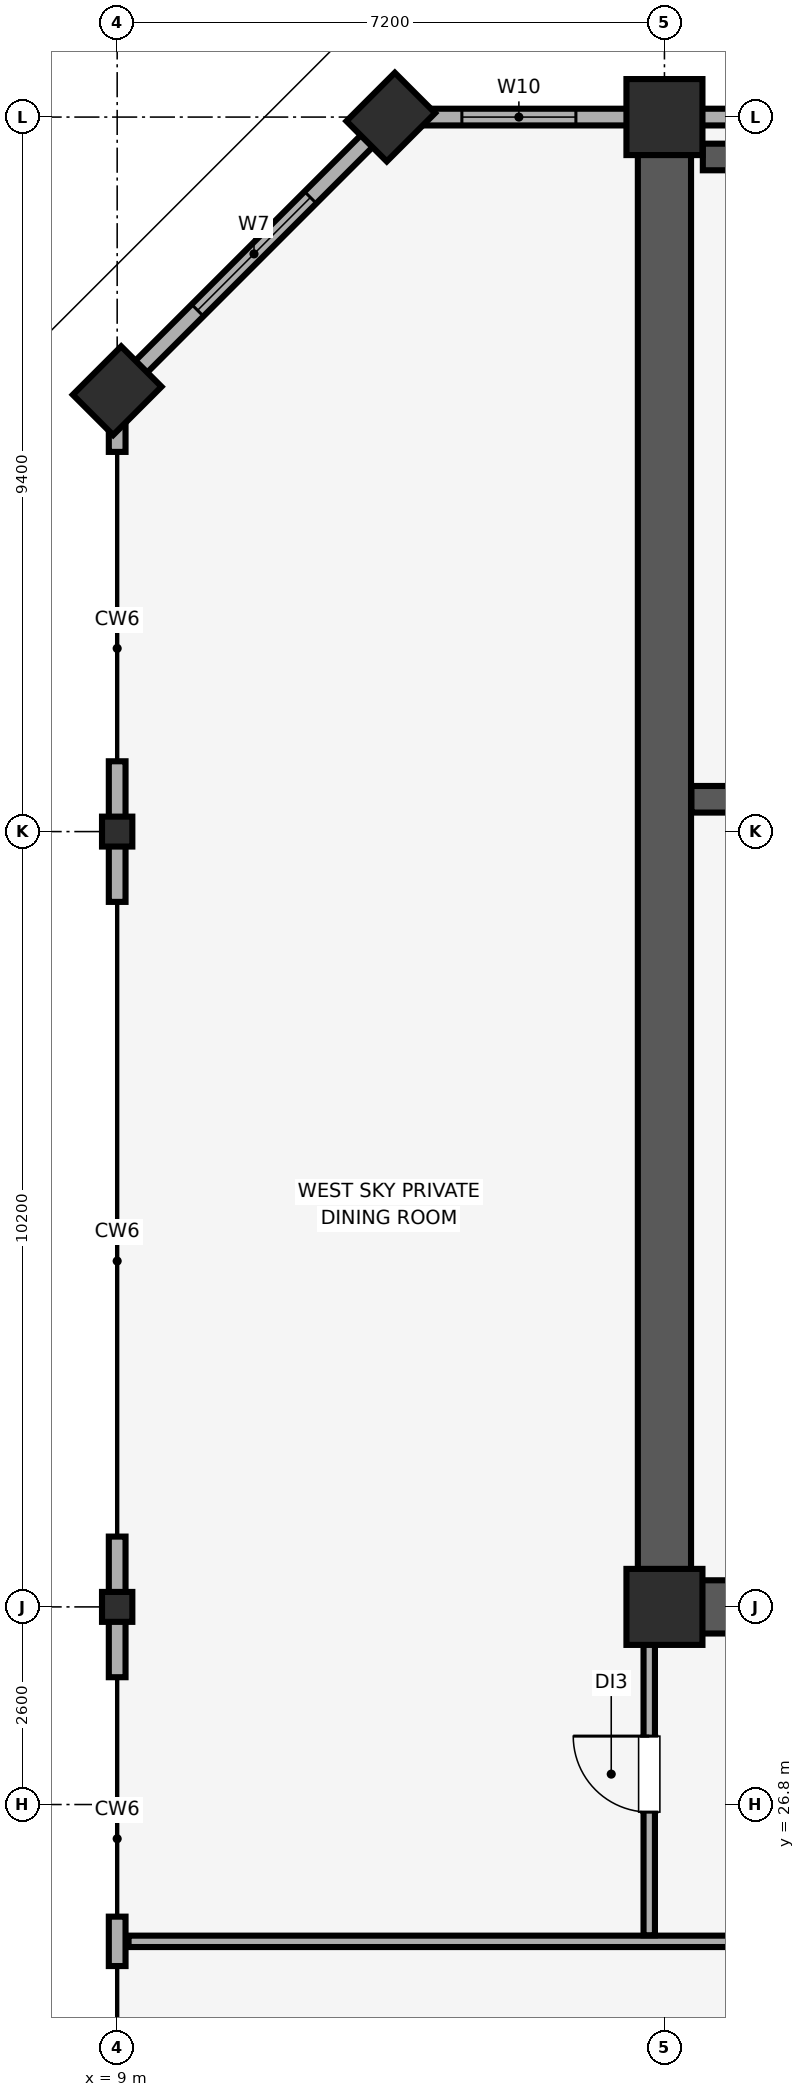
"""IFC4 building model, lengths in metres.
Left out: names, types, materials, properties, quantities, classifications, styles, units other than length and angle.
Written with IfcOpenShell. Run it as: python <this file> out.ifc"""

import sys

from ifc_helpers import new_model, si_unit, direction, frame, frame_2d, origin, origin_2d, place, context, subcontext, project, spatial, rectangle, i_section, extrude, element, fill, save


model = new_model("IFC4")
c1 = context("Model", 3, precision=1e-05, world=origin(), true_north=direction((0.0, 1.0)))
c2 = subcontext(c1, "Body", "Model", "MODEL_VIEW")
j1 = project(units=[si_unit("LENGTHUNIT", "METRE"), si_unit("PLANEANGLEUNIT", "RADIAN")], contexts=[c1])
p1 = place(None, origin())
s1 = spatial("IfcSite", under=j1, at=p1, CompositionType="ELEMENT")
p2 = place(p1, origin())
s2 = spatial("IfcBuilding", under=s1, at=p2, CompositionType="ELEMENT")
p3 = place(p2, frame((0.0, 0.0, 305.7)))
s3 = spatial("IfcBuildingStorey", under=s2, at=p3, CompositionType="ELEMENT", Elevation=305.7)
for number, where, z_axis, x_axis in (
    (1, (9.0, 29.4, 0.0), (0.0, 0.0, 1.0), (1.0, 0.0, 0.0)),
    (2, (9.0, 39.6, 0.0), (0.0, 0.0, 1.0), (1.0, 0.0, 0.0)),
):
    element("IfcColumn", number, at=place(p3, frame(where, z_axis=z_axis, x_axis=x_axis)), inside=s3, PredefinedType="COLUMN", context=c2, shape_type="SweptSolid", body=[
        extrude(i_section(OverallWidth=0.399, OverallDepth=0.394, WebThickness=0.023, FlangeThickness=0.037, FilletRadius=0.015, at=origin_2d()), origin(), (0.0, 0.0, 1.0), 4.7),
    ])
for number, where, z_axis, x_axis in (
    (3, (12.6, 49.0, 0.0), (0.0, 0.0, 1.0), (0.707, 0.707, 0.0)),
    (4, (9.0, 45.4, 0.0), (0.0, 0.0, 1.0), (0.707, 0.707, 0.0)),
):
    element("IfcColumn", number, at=place(p3, frame(where, z_axis=z_axis, x_axis=x_axis)), inside=s3, PredefinedType="PILASTER", context=c2, shape_type="SweptSolid", body=[
        extrude(rectangle(XDim=0.9, YDim=0.75, at=origin_2d()), origin(), (0.0, 0.0, 1.0), 4.7),
    ])
for number, where, z_axis, x_axis in (
    (5, (16.2, 29.4, 0.0), (0.0, 0.0, 1.0), (1.0, 0.0, 0.0)),
    (6, (16.2, 49.0, 0.0), (0.0, 0.0, 1.0), (1.0, 0.0, 0.0)),
):
    element("IfcColumn", number, at=place(p3, frame(where, z_axis=z_axis, x_axis=x_axis)), inside=s3, PredefinedType="COLUMN", context=c2, shape_type="SweptSolid", body=[
        extrude(rectangle(XDim=1.0, YDim=1.0, at=origin_2d()), origin(), (0.0, 0.0, 1.0), 4.7),
    ])
p4 = place(p3, frame((71.4, 49.0, 0.0), z_axis=(0.0, 0.0, 1.0), x_axis=(-1.0, 0.0, 0.0)))
e7 = element("IfcWall", 7, at=p4, inside=s3, PredefinedType="SOLIDWALL", context=c2, shape_type="SweptSolid", body=[
    extrude(rectangle(XDim=58.8, YDim=0.22, at=frame_2d((29.4, 0.0))), origin(), (0.0, 0.0, 1.0), 3.9),
])
p5 = place(p4, frame((56.365, 0.0, 0.85)))
e8 = element("IfcOpeningElement", 8, at=p5, cuts=e7, PredefinedType="OPENING", context=c2, shape_type="SweptSolid", body=[
    extrude(rectangle(XDim=1.5, YDim=1.4, at=frame_2d((0.75, 0.7))), frame((0.0, 0.12, 0.0), z_axis=(0.0, -1.0, 0.0), x_axis=(1.0, 0.0, 0.0)), (0.0, 0.0, 1.0), 0.24),
])
p6 = place(p4, frame((0.935, 0.0, 0.85)))
e9 = element("IfcOpeningElement", 9, at=p6, cuts=e7, PredefinedType="OPENING", context=c2, shape_type="SweptSolid", body=[
    extrude(rectangle(XDim=1.5, YDim=1.4, at=frame_2d((0.75, 0.7))), frame((0.0, 0.12, 0.0), z_axis=(0.0, -1.0, 0.0), x_axis=(1.0, 0.0, 0.0)), (0.0, 0.0, 1.0), 0.24),
])
p7 = place(p4, frame((41.915, 0.0, 0.9)))
e10 = element("IfcOpeningElement", 10, at=p7, cuts=e7, PredefinedType="OPENING", context=c2, shape_type="SweptSolid", body=[
    extrude(rectangle(XDim=3.6, YDim=1.5, at=frame_2d((1.8, 0.75))), frame((0.0, 0.12, 0.0), z_axis=(0.0, -1.0, 0.0), x_axis=(1.0, 0.0, 0.0)), (0.0, 0.0, 1.0), 0.24),
])
p8 = place(p4, frame((35.7, 0.0, 0.9)))
e11 = element("IfcOpeningElement", 11, at=p8, cuts=e7, PredefinedType="OPENING", context=c2, shape_type="SweptSolid", body=[
    extrude(rectangle(XDim=2.4, YDim=1.5, at=frame_2d((1.2, 0.75))), frame((0.0, 0.12, 0.0), z_axis=(0.0, -1.0, 0.0), x_axis=(1.0, 0.0, 0.0)), (0.0, 0.0, 1.0), 0.24),
])
p9 = place(p4, frame((18.95, 0.0, 0.9)))
e12 = element("IfcOpeningElement", 12, at=p9, cuts=e7, PredefinedType="OPENING", context=c2, shape_type="SweptSolid", body=[
    extrude(rectangle(XDim=3.0, YDim=1.5, at=frame_2d((1.5, 0.75))), frame((0.0, 0.12, 0.0), z_axis=(0.0, -1.0, 0.0), x_axis=(1.0, 0.0, 0.0)), (0.0, 0.0, 1.0), 0.24),
])
p10 = place(p4, frame((14.635, 0.0, 0.9)))
e13 = element("IfcOpeningElement", 13, at=p10, cuts=e7, PredefinedType="OPENING", context=c2, shape_type="SweptSolid", body=[
    extrude(rectangle(XDim=2.4, YDim=1.5, at=frame_2d((1.2, 0.75))), frame((0.0, 0.12, 0.0), z_axis=(0.0, -1.0, 0.0), x_axis=(1.0, 0.0, 0.0)), (0.0, 0.0, 1.0), 0.24),
])
p11 = place(p3, frame((12.6, 49.0, 0.0), z_axis=(0.0, 0.0, 1.0), x_axis=(-0.707106781187, -0.707106781187, 0.0)))
e14 = element("IfcWall", 14, at=p11, inside=s3, PredefinedType="SOLIDWALL", context=c2, shape_type="SweptSolid", body=[
    extrude(rectangle(XDim=5.091, YDim=0.22, at=frame_2d((2.546, 0.0))), origin(), (0.0, 0.0, 1.0), 3.9),
])
p12 = place(p11, frame((1.496, 0.0, 0.85)))
e15 = element("IfcOpeningElement", 15, at=p12, cuts=e14, PredefinedType="OPENING", context=c2, shape_type="SweptSolid", body=[
    extrude(rectangle(XDim=2.1, YDim=1.6, at=frame_2d((1.05, 0.8))), frame((0.0, 0.12, 0.0), z_axis=(0.0, -1.0, 0.0), x_axis=(1.0, 0.0, 0.0)), (0.0, 0.0, 1.0), 0.24),
])
p13 = place(p3, frame((9.0, 45.4, 0.0), z_axis=(0.0, 0.0, 1.0), x_axis=(0.0, -1.0, 0.0)))
e16 = element("IfcWall", 16, at=p13, inside=s3, PredefinedType="SOLIDWALL", context=c2, shape_type="SweptSolid", body=[
    extrude(rectangle(XDim=0.805, YDim=0.22, at=frame_2d((0.402, 0.0))), origin(), (0.0, 0.0, 1.0), 4.7),
])
for number, where, z_axis, x_axis in (
    (17, (9.0, 40.525, 0.0), (0.0, 0.0, 1.0), (0.0, -1.0, 0.0)),
    (18, (9.0, 30.325, 0.0), (0.0, 0.0, 1.0), (0.0, -1.0, 0.0)),
):
    element("IfcWall", number, at=place(p3, frame(where, z_axis=z_axis, x_axis=x_axis)), inside=s3, PredefinedType="SOLIDWALL", context=c2, shape_type="SweptSolid", body=[
        extrude(rectangle(XDim=1.85, YDim=0.22, at=frame_2d((0.925, 0.0))), origin(), (0.0, 0.0, 1.0), 3.9),
    ])
p14 = place(p3, frame((9.0, 25.325, 0.0), z_axis=(0.0, 0.0, 1.0), x_axis=(0.0, -1.0, 0.0)))
e19 = element("IfcWall", 19, at=p14, inside=s3, PredefinedType="SOLIDWALL", context=c2, shape_type="SweptSolid", body=[
    extrude(rectangle(XDim=0.65, YDim=0.22, at=frame_2d((0.325, 0.0))), origin(), (0.0, 0.0, 1.0), 3.9),
])
p15 = place(p3, frame((16.2, 29.4, 0.0), z_axis=(0.0, 0.0, 1.0), x_axis=(0.0, 1.0, 0.0)))
e20 = element("IfcWall", 20, at=p15, inside=s3, PredefinedType="SHEAR", context=c2, shape_type="SweptSolid", body=[
    extrude(rectangle(XDim=19.2, YDim=0.7, at=frame_2d((9.6, 0.0))), origin(), (0.0, 0.0, 1.0), 4.7),
])
p16 = place(p3, frame((16.555, 29.4, 0.0), z_axis=(0.0, 0.0, 1.0), x_axis=(1.0, 0.0, 0.0)))
e21 = element("IfcWall", 21, at=p16, inside=s3, PredefinedType="SHEAR", context=c2, shape_type="SweptSolid", body=[
    extrude(rectangle(XDim=7.045, YDim=0.7, at=frame_2d((3.522, 0.0))), origin(), (0.0, 0.0, 1.0), 4.7),
])
p17 = place(p3, frame((16.555, 40.025, 0.0), z_axis=(0.0, 0.0, 1.0), x_axis=(1.0, 0.0, 0.0)))
e22 = element("IfcWall", 22, at=p17, inside=s3, PredefinedType="SHEAR", context=c2, shape_type="SweptSolid", body=[
    extrude(rectangle(XDim=4.3, YDim=0.35, at=frame_2d((2.15, 0.0))), origin(), (0.0, 0.0, 1.0), 4.7),
])
p18 = place(p17, frame((1.91, 0.0, 0.0)))
e23 = element("IfcOpeningElement", 23, at=p18, cuts=e22, PredefinedType="OPENING", context=c2, shape_type="SweptSolid", body=[
    extrude(rectangle(XDim=1.15, YDim=2.15, at=frame_2d((0.575, 1.075))), frame((0.0, 0.185, 0.0), z_axis=(0.0, -1.0, 0.0), x_axis=(1.0, 0.0, 0.0)), (0.0, 0.0, 1.0), 0.37),
])
p19 = place(p3, frame((16.705, 48.475, 0.0), z_axis=(0.0, 0.0, 1.0), x_axis=(1.0, 0.0, 0.0)))
e24 = element("IfcWall", 24, at=p19, inside=s3, PredefinedType="SHEAR", context=c2, shape_type="SweptSolid", body=[
    extrude(rectangle(XDim=4.15, YDim=0.35, at=frame_2d((2.075, 0.0))), origin(), (0.0, 0.0, 1.0), 4.7),
])
p20 = place(p3, frame((9.15, 25.0, 0.0), z_axis=(0.0, 0.0, 1.0), x_axis=(1.0, 0.0, 0.0)))
e25 = element("IfcWall", 25, at=p20, inside=s3, PredefinedType="PARTITIONING", context=c2, shape_type="SweptSolid", body=[
    extrude(rectangle(XDim=32.85, YDim=0.15, at=frame_2d((16.425, 0.0))), origin(), (0.0, 0.0, 1.0), 4.7),
])
p21 = place(p20, frame((17.1, 0.0, 0.0)))
e26 = element("IfcOpeningElement", 26, at=p21, cuts=e25, PredefinedType="OPENING", context=c2, shape_type="SweptSolid", body=[
    extrude(rectangle(XDim=1.5, YDim=2.25, at=frame_2d((0.75, 1.125))), frame((0.0, 0.085, 0.0), z_axis=(0.0, -1.0, 0.0), x_axis=(1.0, 0.0, 0.0)), (0.0, 0.0, 1.0), 0.17),
])
p22 = place(p3, frame((16.0, 25.08, 0.0), z_axis=(0.0, 0.0, 1.0), x_axis=(0.0, 1.0, 0.0)))
e27 = element("IfcWall", 27, at=p22, inside=s3, PredefinedType="PARTITIONING", context=c2, shape_type="SweptSolid", body=[
    extrude(rectangle(XDim=4.31, YDim=0.15, at=frame_2d((2.155, 0.0))), origin(), (0.0, 0.0, 1.0), 4.7),
])
p23 = place(p22, frame((1.62, 0.0, 0.0)))
e28 = element("IfcOpeningElement", 28, at=p23, cuts=e27, PredefinedType="OPENING", context=c2, shape_type="SweptSolid", body=[
    extrude(rectangle(XDim=1.0, YDim=2.15, at=frame_2d((0.5, 1.075))), frame((0.0, 0.085, 0.0), z_axis=(0.0, -1.0, 0.0), x_axis=(1.0, 0.0, 0.0)), (0.0, 0.0, 1.0), 0.17),
])
p24 = place(p12, origin())
e29 = element("IfcWindow", 29, at=p24, inside=s3, PartitioningType="SINGLE_PANEL", PredefinedType="WINDOW", context=c2, shape_type="SweptSolid", body=[
    extrude(rectangle(XDim=2.1, YDim=1.6, at=frame_2d((1.05, 0.8))), frame((0.0, 0.03, 0.0), z_axis=(0.0, -1.0, 0.0), x_axis=(1.0, 0.0, 0.0)), (0.0, 0.0, 1.0), 0.06),
])
fill(e15, e29)
p25 = place(p5, origin())
e30 = element("IfcWindow", 30, at=p25, inside=s3, PartitioningType="SINGLE_PANEL", PredefinedType="WINDOW", context=c2, shape_type="SweptSolid", body=[
    extrude(rectangle(XDim=1.5, YDim=1.4, at=frame_2d((0.75, 0.7))), frame((0.0, 0.03, 0.0), z_axis=(0.0, -1.0, 0.0), x_axis=(1.0, 0.0, 0.0)), (0.0, 0.0, 1.0), 0.06),
])
fill(e8, e30)
p26 = place(p23, origin())
e31 = element("IfcDoor", 31, at=p26, inside=s3, OperationType="SINGLE_SWING_RIGHT", PredefinedType="DOOR", context=c2, shape_type="SweptSolid", body=[
    extrude(rectangle(XDim=1.0, YDim=2.15, at=frame_2d((0.5, 1.075))), frame((0.0, 0.025, 0.0), z_axis=(0.0, -1.0, 0.0), x_axis=(1.0, 0.0, 0.0)), (0.0, 0.0, 1.0), 0.05),
])
fill(e28, e31)
save(model, sys.argv[1])
